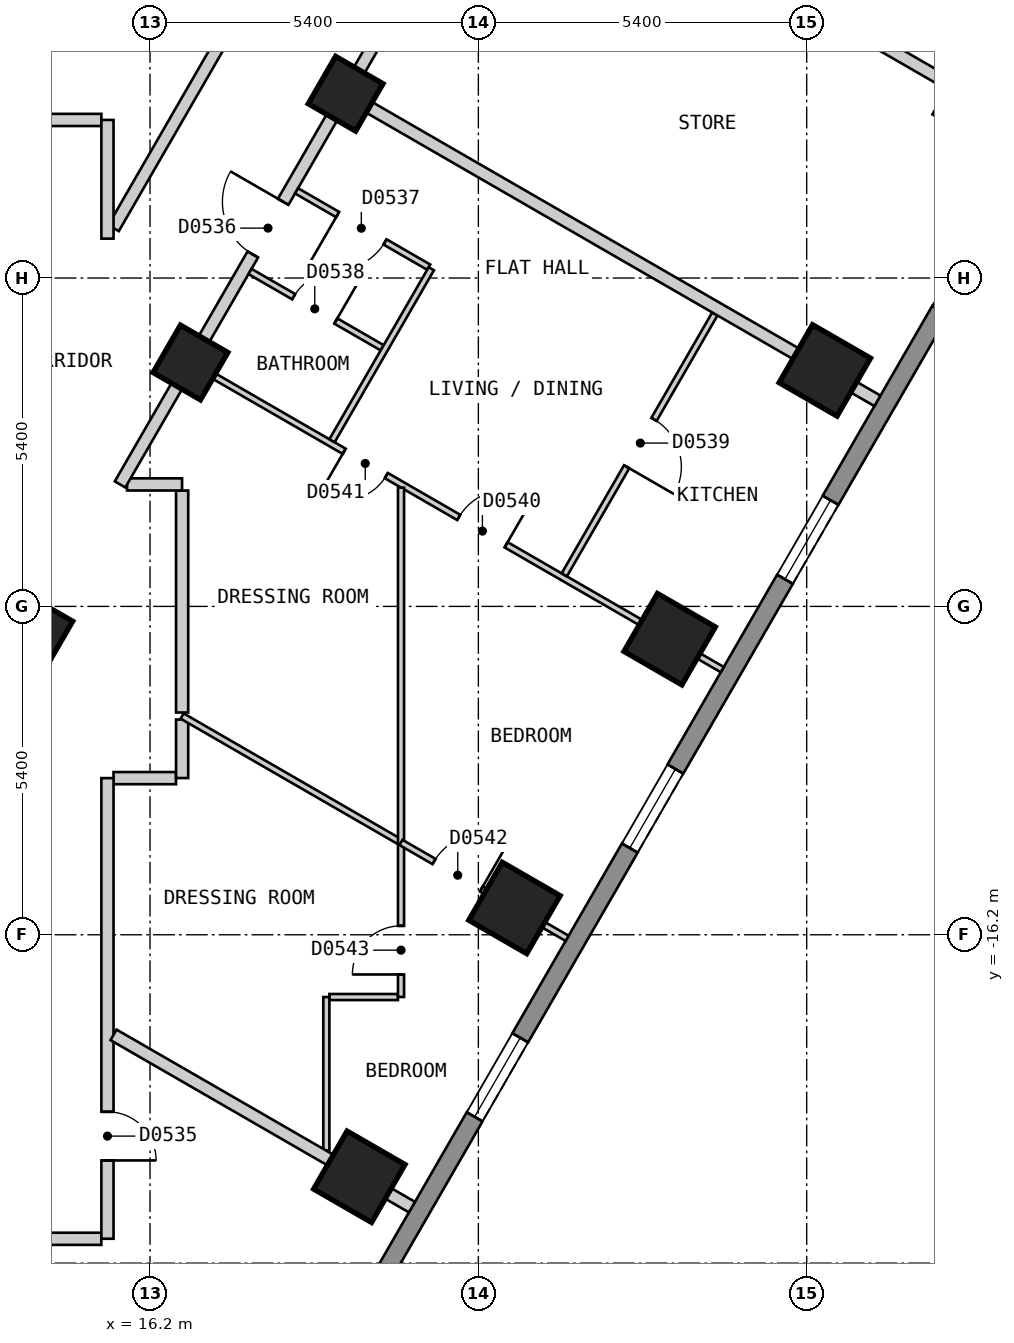
"""IFC4 building model, lengths in metres.
Left out: names, types, materials, properties, quantities, classifications, styles, units other than length and angle.
Written with IfcOpenShell. Run it as: python <this file> out.ifc"""

import sys

from ifc_helpers import new_model, si_unit, direction, frame, frame_2d, origin, origin_2d, place, context, subcontext, project, spatial, polyline, rectangle, outline, extrude, element, fill, save


model = new_model("IFC4")
c1 = context("Model", 3, precision=1e-05, world=origin(), true_north=direction((0.0, 1.0)))
c2 = subcontext(c1, "Body", "Model", "MODEL_VIEW")
j1 = project(units=[si_unit("LENGTHUNIT", "METRE"), si_unit("PLANEANGLEUNIT", "RADIAN")], contexts=[c1])
p1 = place(None, origin())
s1 = spatial("IfcSite", under=j1, at=p1, CompositionType="ELEMENT")
p2 = place(p1, origin())
s2 = spatial("IfcBuilding", under=s1, at=p2, CompositionType="ELEMENT")
p3 = place(p2, frame((0.0, 0.0, 44.4)))
s3 = spatial("IfcBuildingStorey", under=s2, at=p3, CompositionType="ELEMENT", Elevation=44.4)
for number, where, z_axis, x_axis in (
    (1, (19.642, -20.18, 0.0), (0.0, 0.0, 1.0), (0.5, 0.866, 0.0)),
    (2, (22.194, -15.759, 0.0), (0.0, 0.0, 1.0), (0.5, 0.866, 0.0)),
    (3, (24.746, -11.339, 0.0), (0.0, 0.0, 1.0), (0.5, 0.866, 0.0)),
    (4, (27.298, -6.919, 0.0), (0.0, 0.0, 1.0), (0.5, 0.866, 0.0)),
    (5, (29.849, -2.499, 0.0), (0.0, 0.0, 1.0), (0.5, 0.866, 0.0)),
):
    element("IfcColumn", number, at=place(p3, frame(where, z_axis=z_axis, x_axis=x_axis)), inside=s3, PredefinedType="COLUMN", context=c2, shape_type="SweptSolid", body=[
        extrude(rectangle(XDim=1.1, YDim=1.1, at=origin_2d()), origin(), (0.0, 0.0, 1.0), 3.0),
    ])
for number, where, z_axis, x_axis in (
    (6, (14.313, -11.209, 0.0), (0.0, 0.0, 1.0), (0.5, 0.866, 0.0)),
    (7, (16.865, -6.789, 0.0), (0.0, 0.0, 1.0), (0.5, 0.866, 0.0)),
    (8, (19.417, -2.369, 0.0), (0.0, 0.0, 1.0), (0.5, 0.866, 0.0)),
):
    element("IfcColumn", number, at=place(p3, frame(where, z_axis=z_axis, x_axis=x_axis)), inside=s3, PredefinedType="COLUMN", context=c2, shape_type="SweptSolid", body=[
        extrude(rectangle(XDim=0.9, YDim=0.9, at=origin_2d()), origin(), (0.0, 0.0, 1.0), 3.0),
    ])
p4 = place(p3, frame((17.71, -25.825, 0.0), z_axis=(0.0, 0.0, 1.0), x_axis=(0.500001938803, 0.866024284413, 0.0)))
e9 = element("IfcWall", 9, at=p4, inside=s3, PredefinedType="SOLIDWALL", context=c2, shape_type="SweptSolid", body=[
    extrude(outline(polyline([(0.0, -0.15), (27.02, -0.15), (26.94, 0.15), (0.08, 0.15), (0.0, -0.15)])), origin(), (0.0, 0.0, 1.0), 2.7),
])
p5 = place(p4, frame((2.553, 0.0, 0.15)))
e10 = element("IfcOpeningElement", 10, at=p5, cuts=e9, PredefinedType="OPENING", context=c2, shape_type="SweptSolid", body=[
    extrude(rectangle(XDim=1.5, YDim=2.1, at=frame_2d((0.75, 1.05))), frame((0.0, 0.16, 0.0), z_axis=(0.0, -1.0, 0.0), x_axis=(1.0, 0.0, 0.0)), (0.0, 0.0, 1.0), 0.32),
])
p6 = place(p4, frame((7.658, 0.0, 0.15)))
e11 = element("IfcOpeningElement", 11, at=p6, cuts=e9, PredefinedType="OPENING", context=c2, shape_type="SweptSolid", body=[
    extrude(rectangle(XDim=1.5, YDim=2.1, at=frame_2d((0.75, 1.05))), frame((0.0, 0.16, 0.0), z_axis=(0.0, -1.0, 0.0), x_axis=(1.0, 0.0, 0.0)), (0.0, 0.0, 1.0), 0.32),
])
p7 = place(p4, frame((12.761, 0.0, 0.15)))
e12 = element("IfcOpeningElement", 12, at=p7, cuts=e9, PredefinedType="OPENING", context=c2, shape_type="SweptSolid", body=[
    extrude(rectangle(XDim=1.5, YDim=2.1, at=frame_2d((0.75, 1.05))), frame((0.0, 0.16, 0.0), z_axis=(0.0, -1.0, 0.0), x_axis=(1.0, 0.0, 0.0)), (0.0, 0.0, 1.0), 0.32),
])
p8 = place(p4, frame((17.865, 0.0, 0.15)))
e13 = element("IfcOpeningElement", 13, at=p8, cuts=e9, PredefinedType="OPENING", context=c2, shape_type="SweptSolid", body=[
    extrude(rectangle(XDim=1.5, YDim=2.1, at=frame_2d((0.75, 1.05))), frame((0.0, 0.16, 0.0), z_axis=(0.0, -1.0, 0.0), x_axis=(1.0, 0.0, 0.0)), (0.0, 0.0, 1.0), 0.32),
])
p9 = place(p4, frame((22.969, 0.0, 0.15)))
e14 = element("IfcOpeningElement", 14, at=p9, cuts=e9, PredefinedType="OPENING", context=c2, shape_type="SweptSolid", body=[
    extrude(rectangle(XDim=1.5, YDim=2.1, at=frame_2d((0.75, 1.05))), frame((0.0, 0.16, 0.0), z_axis=(0.0, -1.0, 0.0), x_axis=(1.0, 0.0, 0.0)), (0.0, 0.0, 1.0), 0.32),
])
p10 = place(p3, frame((16.728, -8.895, 0.0), z_axis=(0.0, 0.0, 1.0), x_axis=(0.0, -1.0, 0.0)))
e15 = element("IfcWall", 15, at=p10, inside=s3, PredefinedType="PARTITIONING", context=c2, shape_type="SweptSolid", body=[
    extrude(rectangle(XDim=3.65, YDim=0.2, at=frame_2d((1.825, 0.0))), origin(), (0.0, 0.0, 1.0), 2.7),
])
p11 = place(p3, frame((15.822, -8.794, 0.0), z_axis=(0.0, 0.0, 1.0), x_axis=(1.0, 0.0, 0.0)))
e16 = element("IfcWall", 16, at=p11, inside=s3, PredefinedType="PARTITIONING", context=c2, shape_type="SweptSolid", body=[
    extrude(rectangle(XDim=0.905, YDim=0.2, at=frame_2d((0.453, 0.0))), origin(), (0.0, 0.0, 1.0), 2.7),
])
p12 = place(p3, frame((15.6, -13.624, 0.0), z_axis=(0.0, 0.0, 1.0), x_axis=(1.0, 0.0, 0.0)))
e17 = element("IfcWall", 17, at=p12, inside=s3, PredefinedType="PARTITIONING", context=c2, shape_type="SweptSolid", body=[
    extrude(rectangle(XDim=1.027, YDim=0.2, at=frame_2d((0.513, 0.0))), origin(), (0.0, 0.0, 1.0), 2.7),
])
p13 = place(p3, frame((-15.4, -21.2, 0.0), z_axis=(0.0, 0.0, 1.0), x_axis=(1.0, 0.0, 0.0)))
e18 = element("IfcWall", 18, at=p13, inside=s3, PredefinedType="PARTITIONING", context=c2, shape_type="SweptSolid", body=[
    extrude(rectangle(XDim=30.799, YDim=0.2, at=frame_2d((15.399, 0.0))), origin(), (0.0, 0.0, 1.0), 2.7),
])
p14 = place(p13, frame((4.985, 0.0, 0.0)))
e19 = element("IfcOpeningElement", 19, at=p14, cuts=e18, PredefinedType="OPENING", context=c2, shape_type="SweptSolid", body=[
    extrude(rectangle(XDim=0.9, YDim=2.1, at=frame_2d((0.45, 1.05))), frame((0.0, 0.11, 0.0), z_axis=(0.0, -1.0, 0.0), x_axis=(1.0, 0.0, 0.0)), (0.0, 0.0, 1.0), 0.22),
])
p15 = place(p13, frame((20.005, 0.0, 0.0)))
e20 = element("IfcOpeningElement", 20, at=p15, cuts=e18, PredefinedType="OPENING", context=c2, shape_type="SweptSolid", body=[
    extrude(rectangle(XDim=1.0, YDim=2.1, at=frame_2d((0.5, 1.05))), frame((0.0, 0.11, 0.0), z_axis=(0.0, -1.0, 0.0), x_axis=(1.0, 0.0, 0.0)), (0.0, 0.0, 1.0), 0.22),
])
p16 = place(p13, frame((24.916, 0.0, 0.0)))
e21 = element("IfcOpeningElement", 21, at=p16, cuts=e18, PredefinedType="OPENING", context=c2, shape_type="SweptSolid", body=[
    extrude(rectangle(XDim=0.9, YDim=2.1, at=frame_2d((0.45, 1.05))), frame((0.0, 0.11, 0.0), z_axis=(0.0, -1.0, 0.0), x_axis=(1.0, 0.0, 0.0)), (0.0, 0.0, 1.0), 0.22),
])
p17 = place(p3, frame((7.028, -2.8, 0.0), z_axis=(0.0, 0.0, 1.0), x_axis=(1.0, 0.0, 0.0)))
e22 = element("IfcWall", 22, at=p17, inside=s3, PredefinedType="PARTITIONING", context=c2, shape_type="SweptSolid", body=[
    extrude(rectangle(XDim=8.372, YDim=0.2, at=frame_2d((4.186, 0.0))), origin(), (0.0, 0.0, 1.0), 2.7),
])
p18 = place(p3, frame((15.6, -4.579, 0.0), z_axis=(0.0, 0.0, 1.0), x_axis=(0.499927597274, 0.866067201483, 0.0)))
e23 = element("IfcWall", 23, at=p18, inside=s3, PredefinedType="PARTITIONING", context=c2, shape_type="SweptSolid", body=[
    extrude(rectangle(XDim=5.288, YDim=0.2, at=frame_2d((2.644, 0.0))), origin(), (0.0, 0.0, 1.0), 2.7),
])
p19 = place(p3, frame((15.707, -8.794, 0.0), z_axis=(0.0, 0.0, 1.0), x_axis=(0.50000451406, 0.866022797575, 0.0)))
e24 = element("IfcWall", 24, at=p19, inside=s3, PredefinedType="PARTITIONING", context=c2, shape_type="SweptSolid", body=[
    extrude(rectangle(XDim=10.04, YDim=0.2, at=frame_2d((5.02, 0.0))), origin(), (0.0, 0.0, 1.0), 2.7),
])
p20 = place(p19, frame((4.367, 0.0, 0.0)))
e25 = element("IfcOpeningElement", 25, at=p20, cuts=e24, PredefinedType="OPENING", context=c2, shape_type="SweptSolid", body=[
    extrude(rectangle(XDim=1.0, YDim=2.1, at=frame_2d((0.5, 1.05))), frame((0.0, 0.11, 0.0), z_axis=(0.0, -1.0, 0.0), x_axis=(1.0, 0.0, 0.0)), (0.0, 0.0, 1.0), 0.22),
])
p21 = place(p19, frame((8.402, 0.0, 0.0)))
e26 = element("IfcOpeningElement", 26, at=p21, cuts=e24, PredefinedType="OPENING", context=c2, shape_type="SweptSolid", body=[
    extrude(rectangle(XDim=0.8, YDim=2.1, at=frame_2d((0.4, 1.05))), frame((0.0, 0.11, 0.0), z_axis=(0.0, -1.0, 0.0), x_axis=(1.0, 0.0, 0.0)), (0.0, 0.0, 1.0), 0.22),
])
p22 = place(p3, frame((15.5, -21.199, 0.0), z_axis=(0.0, 0.0, 1.0), x_axis=(0.0, 1.0, 0.0)))
e27 = element("IfcWall", 27, at=p22, inside=s3, PredefinedType="PARTITIONING", context=c2, shape_type="SweptSolid", body=[
    extrude(rectangle(XDim=7.575, YDim=0.2, at=frame_2d((3.788, 0.0))), origin(), (0.0, 0.0, 1.0), 2.7),
])
p23 = place(p22, frame((1.288, 0.0, 0.0)))
e28 = element("IfcOpeningElement", 28, at=p23, cuts=e27, PredefinedType="OPENING", context=c2, shape_type="SweptSolid", body=[
    extrude(rectangle(XDim=0.8, YDim=2.1, at=frame_2d((0.4, 1.05))), frame((0.0, 0.11, 0.0), z_axis=(0.0, -1.0, 0.0), x_axis=(1.0, 0.0, 0.0)), (0.0, 0.0, 1.0), 0.22),
])
p24 = place(p3, frame((15.5, -4.752, 0.0), z_axis=(0.0, 0.0, 1.0), x_axis=(0.0, 1.0, 0.0)))
e29 = element("IfcWall", 29, at=p24, inside=s3, PredefinedType="PARTITIONING", context=c2, shape_type="SweptSolid", body=[
    extrude(rectangle(XDim=1.952, YDim=0.2, at=frame_2d((0.976, 0.0))), origin(), (0.0, 0.0, 1.0), 2.7),
])
p25 = place(p3, frame((16.728, -13.623, 0.0), z_axis=(0.0, 0.0, 1.0), x_axis=(0.0, 1.0, 0.0)))
e30 = element("IfcWall", 30, at=p25, inside=s3, PredefinedType="PARTITIONING", context=c2, shape_type="SweptSolid", body=[
    extrude(rectangle(XDim=0.962, YDim=0.2, at=frame_2d((0.481, 0.0))), origin(), (0.0, 0.0, 1.0), 2.7),
])
p26 = place(p3, frame((16.728, -12.603, 0.0), z_axis=(0.0, 0.0, 1.0), x_axis=(0.865975293465, -0.500086783578, 0.0)))
e31 = element("IfcWall", 31, at=p26, inside=s3, PredefinedType="PARTITIONING", context=c2, shape_type="SweptSolid", body=[
    extrude(rectangle(XDim=4.157, YDim=0.1, at=frame_2d((2.079, 0.0))), origin(), (0.0, 0.0, 1.0), 2.7),
])
p27 = place(p3, frame((17.844, -5.292, 0.0), z_axis=(0.0, 0.0, 1.0), x_axis=(0.866038211682, -0.499977815414, 0.0)))
e32 = element("IfcWall", 32, at=p27, inside=s3, PredefinedType="PARTITIONING", context=c2, shape_type="SweptSolid", body=[
    extrude(rectangle(XDim=2.51, YDim=0.1, at=frame_2d((1.255, 0.0))), origin(), (0.0, 0.0, 1.0), 2.7),
])
p28 = place(p27, frame((0.83, 0.0, 0.0)))
e33 = element("IfcOpeningElement", 33, at=p28, cuts=e32, PredefinedType="OPENING", context=c2, shape_type="SweptSolid", body=[
    extrude(rectangle(XDim=0.8, YDim=2.1, at=frame_2d((0.4, 1.05))), frame((0.0, 0.06, 0.0), z_axis=(0.0, -1.0, 0.0), x_axis=(1.0, 0.0, 0.0)), (0.0, 0.0, 1.0), 0.12),
])
p29 = place(p3, frame((18.61, -3.966, 0.0), z_axis=(0.0, 0.0, 1.0), x_axis=(0.865958718457, -0.500115484592, 0.0)))
e34 = element("IfcWall", 34, at=p29, inside=s3, PredefinedType="PARTITIONING", context=c2, shape_type="SweptSolid", body=[
    extrude(rectangle(XDim=2.509, YDim=0.1, at=frame_2d((1.255, 0.0))), origin(), (0.0, 0.0, 1.0), 2.7),
])
p30 = place(p29, frame((0.78, 0.0, 0.0)))
e35 = element("IfcOpeningElement", 35, at=p30, cuts=e34, PredefinedType="OPENING", context=c2, shape_type="SweptSolid", body=[
    extrude(rectangle(XDim=0.9, YDim=2.1, at=frame_2d((0.45, 1.05))), frame((0.0, 0.06, 0.0), z_axis=(0.0, -1.0, 0.0), x_axis=(1.0, 0.0, 0.0)), (0.0, 0.0, 1.0), 0.12),
])
p31 = place(p3, frame((16.951, -6.839, 0.0), z_axis=(0.0, 0.0, 1.0), x_axis=(0.866022959057, -0.500004234368, 0.0)))
e36 = element("IfcWall", 36, at=p31, inside=s3, PredefinedType="PARTITIONING", context=c2, shape_type="SweptSolid", body=[
    extrude(rectangle(XDim=10.0, YDim=0.1, at=frame_2d((5.0, 0.0))), origin(), (0.0, 0.0, 1.0), 2.7),
])
p32 = place(p31, frame((4.995, 0.0, 0.0)))
e37 = element("IfcOpeningElement", 37, at=p32, cuts=e36, PredefinedType="OPENING", context=c2, shape_type="SweptSolid", body=[
    extrude(rectangle(XDim=0.9, YDim=2.1, at=frame_2d((0.45, 1.05))), frame((0.0, 0.06, 0.0), z_axis=(0.0, -1.0, 0.0), x_axis=(1.0, 0.0, 0.0)), (0.0, 0.0, 1.0), 0.12),
])
p33 = place(p31, frame((2.82, 0.0, 0.0)))
e38 = element("IfcOpeningElement", 38, at=p33, cuts=e36, PredefinedType="OPENING", context=c2, shape_type="SweptSolid", body=[
    extrude(rectangle(XDim=0.8, YDim=2.1, at=frame_2d((0.4, 1.05))), frame((0.0, 0.06, 0.0), z_axis=(0.0, -1.0, 0.0), x_axis=(1.0, 0.0, 0.0)), (0.0, 0.0, 1.0), 0.12),
])
p34 = place(p3, frame((19.15, -17.224, 0.0), z_axis=(0.0, 0.0, 1.0), x_axis=(1.0, 0.0, 0.0)))
e39 = element("IfcWall", 39, at=p34, inside=s3, PredefinedType="PARTITIONING", context=c2, shape_type="SweptSolid", body=[
    extrude(rectangle(XDim=1.127, YDim=0.1, at=frame_2d((0.563, 0.0))), origin(), (0.0, 0.0, 1.0), 2.7),
])
p35 = place(p3, frame((19.193, -8.076, 0.0), z_axis=(0.0, 0.0, 1.0), x_axis=(0.499901468276, 0.866082283629, 0.0)))
e40 = element("IfcWall", 40, at=p35, inside=s3, PredefinedType="PARTITIONING", context=c2, shape_type="SweptSolid", body=[
    extrude(rectangle(XDim=3.266, YDim=0.1, at=frame_2d((1.633, 0.0))), origin(), (0.0, 0.0, 1.0), 2.7),
])
p36 = place(p3, frame((23.013, -10.281, 0.0), z_axis=(0.0, 0.0, 1.0), x_axis=(0.499881743012, 0.866093668724, 0.0)))
e41 = element("IfcWall", 41, at=p36, inside=s3, PredefinedType="PARTITIONING", context=c2, shape_type="SweptSolid", body=[
    extrude(rectangle(XDim=4.953, YDim=0.1, at=frame_2d((2.477, 0.0))), origin(), (0.0, 0.0, 1.0), 2.7),
])
p37 = place(p36, frame((2.052, 0.0, 0.0)))
e42 = element("IfcOpeningElement", 42, at=p37, cuts=e41, PredefinedType="OPENING", context=c2, shape_type="SweptSolid", body=[
    extrude(rectangle(XDim=0.9, YDim=2.1, at=frame_2d((0.45, 1.05))), frame((0.0, 0.06, 0.0), z_axis=(0.0, -1.0, 0.0), x_axis=(1.0, 0.0, 0.0)), (0.0, 0.0, 1.0), 0.12),
])
p38 = place(p3, frame((19.1, -19.751, 0.0), z_axis=(0.0, 0.0, 1.0), x_axis=(0.0, 1.0, 0.0)))
e43 = element("IfcWall", 43, at=p38, inside=s3, PredefinedType="PARTITIONING", context=c2, shape_type="SweptSolid", body=[
    extrude(rectangle(XDim=2.527, YDim=0.1, at=frame_2d((1.263, 0.0))), origin(), (0.0, 0.0, 1.0), 2.7),
])
p39 = place(p3, frame((20.328, -17.223, 0.0), z_axis=(0.0, 0.0, 1.0), x_axis=(0.0, 1.0, 0.0)))
e44 = element("IfcWall", 44, at=p39, inside=s3, PredefinedType="PARTITIONING", context=c2, shape_type="SweptSolid", body=[
    extrude(rectangle(XDim=8.376, YDim=0.1, at=frame_2d((4.188, 0.0))), origin(), (0.0, 0.0, 1.0), 2.7),
])
p40 = place(p39, frame((0.37, 0.0, 0.0)))
e45 = element("IfcOpeningElement", 45, at=p40, cuts=e44, PredefinedType="OPENING", context=c2, shape_type="SweptSolid", body=[
    extrude(rectangle(XDim=0.8, YDim=2.1, at=frame_2d((0.4, 1.05))), frame((0.0, 0.06, 0.0), z_axis=(0.0, -1.0, 0.0), x_axis=(1.0, 0.0, 0.0)), (0.0, 0.0, 1.0), 0.12),
])
p41 = place(p3, frame((12.297, -21.3, 0.0), z_axis=(0.0, 0.0, 1.0), x_axis=(0.500056399578, -0.865992839024, 0.0)))
e46 = element("IfcWall", 46, at=p41, inside=s3, PredefinedType="PARTITIONING", context=c2, shape_type="SweptSolid", body=[
    extrude(rectangle(XDim=6.455, YDim=0.2, at=frame_2d((3.228, 0.0))), origin(), (0.0, 0.0, 1.0), 2.7),
])
p42 = place(p3, frame((15.6, -17.846, 0.0), z_axis=(0.0, 0.0, 1.0), x_axis=(0.866071523686, -0.499920109479, 0.0)))
e47 = element("IfcWall", 47, at=p42, inside=s3, PredefinedType="PARTITIONING", context=c2, shape_type="SweptSolid", body=[
    extrude(rectangle(XDim=5.667, YDim=0.2, at=frame_2d((2.833, 0.0))), origin(), (0.0, 0.0, 1.0), 2.7),
])
p43 = place(p3, frame((19.503, -2.419, 0.0), z_axis=(0.0, 0.0, 1.0), x_axis=(0.866022959057, -0.500004234368, 0.0)))
e48 = element("IfcWall", 48, at=p43, inside=s3, PredefinedType="PARTITIONING", context=c2, shape_type="SweptSolid", body=[
    extrude(rectangle(XDim=10.0, YDim=0.2, at=frame_2d((5.0, 0.0))), origin(), (0.0, 0.0, 1.0), 2.7),
])
p44 = place(p3, frame((25.693, -0.099, 0.0), z_axis=(0.0, 0.0, 1.0), x_axis=(0.866032775405, -0.499987231761, 0.0)))
e49 = element("IfcWall", 49, at=p44, inside=s3, PredefinedType="PARTITIONING", context=c2, shape_type="SweptSolid", body=[
    extrude(rectangle(XDim=5.8, YDim=0.2, at=frame_2d((2.9, 0.0))), origin(), (0.0, 0.0, 1.0), 2.7),
])
p45 = place(p3, frame((20.328, -14.682, 0.0), z_axis=(0.0, 0.0, 1.0), x_axis=(0.866063163075, -0.499934593286, 0.0)))
e50 = element("IfcWall", 50, at=p45, inside=s3, PredefinedType="PARTITIONING", context=c2, shape_type="SweptSolid", body=[
    extrude(rectangle(XDim=3.155, YDim=0.1, at=frame_2d((1.577, 0.0))), origin(), (0.0, 0.0, 1.0), 2.7),
])
p46 = place(p45, frame((0.627, 0.0, 0.0)))
e51 = element("IfcOpeningElement", 51, at=p46, cuts=e50, PredefinedType="OPENING", context=c2, shape_type="SweptSolid", body=[
    extrude(rectangle(XDim=0.9, YDim=2.1, at=frame_2d((0.45, 1.05))), frame((0.0, 0.06, 0.0), z_axis=(0.0, -1.0, 0.0), x_axis=(1.0, 0.0, 0.0)), (0.0, 0.0, 1.0), 0.12),
])
p47 = place(p6, origin())
e52 = element("IfcWindow", 52, at=p47, inside=s3, PartitioningType="SINGLE_PANEL", PredefinedType="WINDOW", context=c2, shape_type="SweptSolid", body=[
    extrude(rectangle(XDim=1.5, YDim=2.1, at=frame_2d((0.75, 1.05))), frame((0.0, 0.03, 0.0), z_axis=(0.0, -1.0, 0.0), x_axis=(1.0, 0.0, 0.0)), (0.0, 0.0, 1.0), 0.06),
])
fill(e11, e52)
p48 = place(p7, origin())
e53 = element("IfcWindow", 53, at=p48, inside=s3, PartitioningType="SINGLE_PANEL", PredefinedType="WINDOW", context=c2, shape_type="SweptSolid", body=[
    extrude(rectangle(XDim=1.5, YDim=2.1, at=frame_2d((0.75, 1.05))), frame((0.0, 0.03, 0.0), z_axis=(0.0, -1.0, 0.0), x_axis=(1.0, 0.0, 0.0)), (0.0, 0.0, 1.0), 0.06),
])
fill(e12, e53)
p49 = place(p8, origin())
e54 = element("IfcWindow", 54, at=p49, inside=s3, PartitioningType="SINGLE_PANEL", PredefinedType="WINDOW", context=c2, shape_type="SweptSolid", body=[
    extrude(rectangle(XDim=1.5, YDim=2.1, at=frame_2d((0.75, 1.05))), frame((0.0, 0.03, 0.0), z_axis=(0.0, -1.0, 0.0), x_axis=(1.0, 0.0, 0.0)), (0.0, 0.0, 1.0), 0.06),
])
fill(e13, e54)
p50 = place(p23, origin())
e55 = element("IfcDoor", 55, at=p50, inside=s3, OperationType="SINGLE_SWING_LEFT", PredefinedType="DOOR", context=c2, shape_type="SweptSolid", body=[
    extrude(rectangle(XDim=0.8, YDim=2.1, at=frame_2d((0.4, 1.05))), frame((0.0, 0.025, 0.0), z_axis=(0.0, -1.0, 0.0), x_axis=(1.0, 0.0, 0.0)), (0.0, 0.0, 1.0), 0.05),
])
fill(e28, e55)
p51 = place(p20, origin())
e56 = element("IfcDoor", 56, at=p51, inside=s3, OperationType="SINGLE_SWING_RIGHT", PredefinedType="DOOR", context=c2, shape_type="SweptSolid", body=[
    extrude(rectangle(XDim=1.0, YDim=2.1, at=frame_2d((0.5, 1.05))), frame((0.0, 0.025, 0.0), z_axis=(0.0, -1.0, 0.0), x_axis=(1.0, 0.0, 0.0)), (0.0, 0.0, 1.0), 0.05),
])
fill(e25, e56)
p52 = place(p30, origin())
e57 = element("IfcDoor", 57, at=p52, inside=s3, OperationType="SINGLE_SWING_LEFT", PredefinedType="DOOR", context=c2, shape_type="SweptSolid", body=[
    extrude(rectangle(XDim=0.9, YDim=2.1, at=frame_2d((0.45, 1.05))), frame((0.0, 0.025, 0.0), z_axis=(0.0, -1.0, 0.0), x_axis=(1.0, 0.0, 0.0)), (0.0, 0.0, 1.0), 0.05),
])
fill(e35, e57)
p53 = place(p28, origin())
e58 = element("IfcDoor", 58, at=p53, inside=s3, OperationType="SINGLE_SWING_RIGHT", PredefinedType="DOOR", context=c2, shape_type="SweptSolid", body=[
    extrude(rectangle(XDim=0.8, YDim=2.1, at=frame_2d((0.4, 1.05))), frame((0.0, 0.025, 0.0), z_axis=(0.0, -1.0, 0.0), x_axis=(1.0, 0.0, 0.0)), (0.0, 0.0, 1.0), 0.05),
])
fill(e33, e58)
p54 = place(p37, origin())
e59 = element("IfcDoor", 59, at=p54, inside=s3, OperationType="SINGLE_SWING_LEFT", PredefinedType="DOOR", context=c2, shape_type="SweptSolid", body=[
    extrude(rectangle(XDim=0.9, YDim=2.1, at=frame_2d((0.45, 1.05))), frame((0.0, 0.025, 0.0), z_axis=(0.0, -1.0, 0.0), x_axis=(1.0, 0.0, 0.0)), (0.0, 0.0, 1.0), 0.05),
])
fill(e42, e59)
p55 = place(p32, origin())
e60 = element("IfcDoor", 60, at=p55, inside=s3, OperationType="SINGLE_SWING_RIGHT", PredefinedType="DOOR", context=c2, shape_type="SweptSolid", body=[
    extrude(rectangle(XDim=0.9, YDim=2.1, at=frame_2d((0.45, 1.05))), frame((0.0, 0.025, 0.0), z_axis=(0.0, -1.0, 0.0), x_axis=(1.0, 0.0, 0.0)), (0.0, 0.0, 1.0), 0.05),
])
fill(e37, e60)
p56 = place(p33, origin())
e61 = element("IfcDoor", 61, at=p56, inside=s3, OperationType="SINGLE_SWING_LEFT", PredefinedType="DOOR", context=c2, shape_type="SweptSolid", body=[
    extrude(rectangle(XDim=0.8, YDim=2.1, at=frame_2d((0.4, 1.05))), frame((0.0, 0.025, 0.0), z_axis=(0.0, -1.0, 0.0), x_axis=(1.0, 0.0, 0.0)), (0.0, 0.0, 1.0), 0.05),
])
fill(e38, e61)
p57 = place(p46, origin())
e62 = element("IfcDoor", 62, at=p57, inside=s3, OperationType="SINGLE_SWING_RIGHT", PredefinedType="DOOR", context=c2, shape_type="SweptSolid", body=[
    extrude(rectangle(XDim=0.9, YDim=2.1, at=frame_2d((0.45, 1.05))), frame((0.0, 0.025, 0.0), z_axis=(0.0, -1.0, 0.0), x_axis=(1.0, 0.0, 0.0)), (0.0, 0.0, 1.0), 0.05),
])
fill(e51, e62)
p58 = place(p40, origin())
e63 = element("IfcDoor", 63, at=p58, inside=s3, OperationType="SINGLE_SWING_LEFT", PredefinedType="DOOR", context=c2, shape_type="SweptSolid", body=[
    extrude(rectangle(XDim=0.8, YDim=2.1, at=frame_2d((0.4, 1.05))), frame((0.0, 0.025, 0.0), z_axis=(0.0, -1.0, 0.0), x_axis=(1.0, 0.0, 0.0)), (0.0, 0.0, 1.0), 0.05),
])
fill(e45, e63)
save(model, sys.argv[1])
